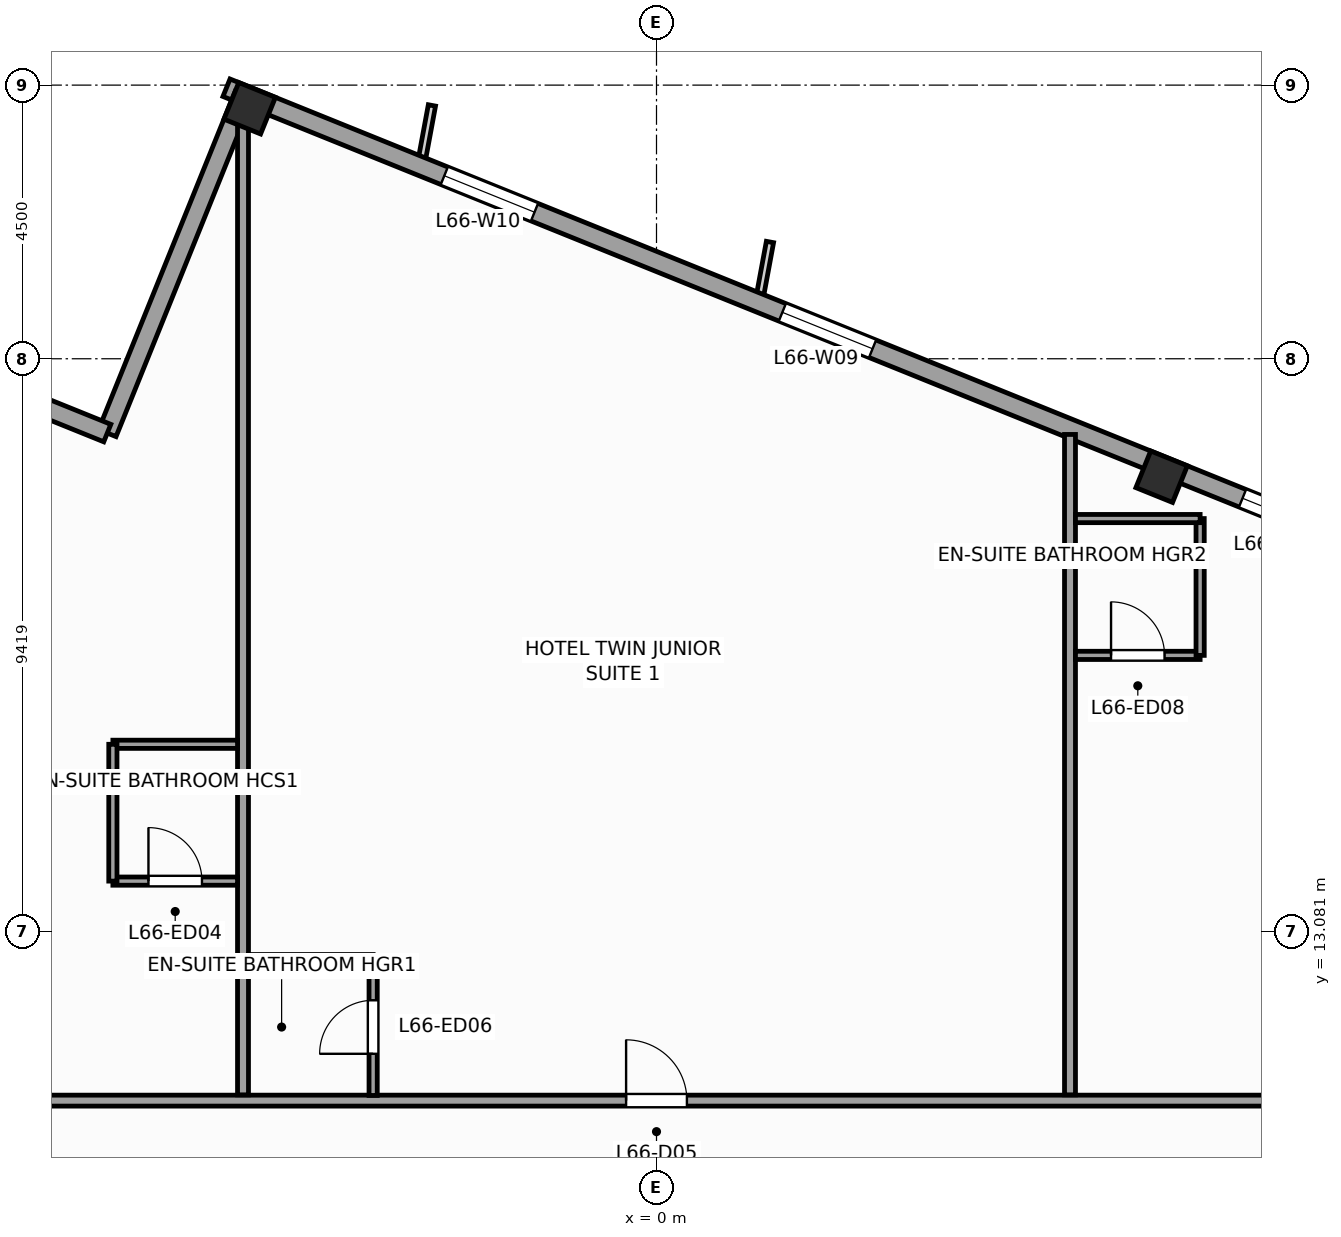
"""IFC4 building model, lengths in metres.
Left out: names, types, materials, properties, quantities, classifications, styles, units other than length and angle.
Written with IfcOpenShell. Run it as: python <this file> out.ifc"""

import sys

from ifc_helpers import new_model, si_unit, direction, frame, frame_2d, origin, origin_2d, place, context, subcontext, project, spatial, rectangle, extrude, source, transform, mapped, element, fill, save


model = new_model("IFC4")
c1 = context("Model", 3, precision=1e-05, world=origin(), true_north=direction((0.0, 1.0)))
c2 = subcontext(c1, "Body", "Model", "MODEL_VIEW")
j1 = project(units=[si_unit("LENGTHUNIT", "METRE"), si_unit("PLANEANGLEUNIT", "RADIAN")], contexts=[c1])
p1 = place(None, origin())
s1 = spatial("IfcSite", under=j1, at=p1, CompositionType="ELEMENT")
p2 = place(p1, origin())
s2 = spatial("IfcBuilding", under=s1, at=p2, CompositionType="ELEMENT")
p3 = place(p2, frame((0.0, 0.0, 272.4)))
s3 = spatial("IfcBuildingStorey", under=s2, at=p3, CompositionType="ELEMENT", Elevation=272.4)
m1 = source(origin(), c2, "Body", "SweptSolid", [
    extrude(rectangle(XDim=0.65, YDim=0.65, at=origin_2d()), origin(), (0.0, 0.0, 1.0), 3.6),
])
for number, where, z_axis, x_axis in (
    (1, (8.307, 20.56, 0.0), (0.0, 0.0, 1.0), (0.375, 0.927, 0.0)),
    (2, (-6.69, 26.62, 0.0), (0.0, 0.0, 1.0), (0.375, 0.927, 0.0)),
):
    element("IfcColumn", number, at=place(p3, frame(where, z_axis=z_axis, x_axis=x_axis)), inside=s3, PredefinedType="COLUMN", context=c2, shape_type="MappedRepresentation", body=[
        mapped(m1, transform((0.0, 0.0, 0.0), scale=1.0)),
    ])
p4 = place(p3, frame((23.813, 14.479, 0.0), z_axis=(0.0, 0.0, 1.0), x_axis=(-0.927182657188, 0.374609557019, 0.0)))
e3 = element("IfcWall", 3, at=p4, inside=s3, PredefinedType="STANDARD", context=c2, shape_type="SweptSolid", body=[
    extrude(rectangle(XDim=33.31, YDim=0.31, at=frame_2d((16.655, 0.0))), origin(), (0.0, 0.0, 1.0), 2.75),
])
p5 = place(p4, frame((3.197, 0.0, 0.47)))
e4 = element("IfcOpeningElement", 4, at=p5, cuts=e3, PredefinedType="OPENING", context=c2, shape_type="SweptSolid", body=[
    extrude(rectangle(XDim=1.6, YDim=2.1, at=frame_2d((0.8, 1.05))), frame((0.0, 0.165, 0.0), z_axis=(0.0, -1.0, 0.0), x_axis=(1.0, 0.0, 0.0)), (0.0, 0.0, 1.0), 0.33),
])
p6 = place(p4, frame((8.86, 0.0, 0.47)))
e5 = element("IfcOpeningElement", 5, at=p6, cuts=e3, PredefinedType="OPENING", context=c2, shape_type="SweptSolid", body=[
    extrude(rectangle(XDim=1.6, YDim=2.1, at=frame_2d((0.8, 1.05))), frame((0.0, 0.165, 0.0), z_axis=(0.0, -1.0, 0.0), x_axis=(1.0, 0.0, 0.0)), (0.0, 0.0, 1.0), 0.33),
])
p7 = place(p4, frame((13.689, 0.0, 0.47)))
e6 = element("IfcOpeningElement", 6, at=p7, cuts=e3, PredefinedType="OPENING", context=c2, shape_type="SweptSolid", body=[
    extrude(rectangle(XDim=1.6, YDim=2.1, at=frame_2d((0.8, 1.05))), frame((0.0, 0.165, 0.0), z_axis=(0.0, -1.0, 0.0), x_axis=(1.0, 0.0, 0.0)), (0.0, 0.0, 1.0), 0.33),
])
p8 = place(p4, frame((21.851, 0.0, 0.47)))
e7 = element("IfcOpeningElement", 7, at=p8, cuts=e3, PredefinedType="OPENING", context=c2, shape_type="SweptSolid", body=[
    extrude(rectangle(XDim=1.6, YDim=2.1, at=frame_2d((0.8, 1.05))), frame((0.0, 0.165, 0.0), z_axis=(0.0, -1.0, 0.0), x_axis=(1.0, 0.0, 0.0)), (0.0, 0.0, 1.0), 0.33),
])
p9 = place(p4, frame((27.847, 0.0, 0.47)))
e8 = element("IfcOpeningElement", 8, at=p9, cuts=e3, PredefinedType="OPENING", context=c2, shape_type="SweptSolid", body=[
    extrude(rectangle(XDim=1.6, YDim=2.1, at=frame_2d((0.8, 1.05))), frame((0.0, 0.165, 0.0), z_axis=(0.0, -1.0, 0.0), x_axis=(1.0, 0.0, 0.0)), (0.0, 0.0, 1.0), 0.33),
])
p10 = place(p3, frame((-6.784, 26.841, 0.0), z_axis=(0.0, 0.0, 1.0), x_axis=(-0.374636620962, -0.927171722085, 0.0)))
e9 = element("IfcWall", 9, at=p10, inside=s3, PredefinedType="STANDARD", context=c2, shape_type="SweptSolid", body=[
    extrude(rectangle(XDim=6.0, YDim=0.31, at=frame_2d((3.0, 0.0))), origin(), (0.0, 0.0, 1.0), 2.65),
])
p11 = place(p3, frame((-9.032, 21.278, 0.0), z_axis=(0.0, 0.0, 1.0), x_axis=(-0.927185411764, 0.374602739196, 0.0)))
e10 = element("IfcWall", 10, at=p11, inside=s3, PredefinedType="STANDARD", context=c2, shape_type="SweptSolid", body=[
    extrude(rectangle(XDim=6.155, YDim=0.31, at=frame_2d((3.078, 0.0))), origin(), (0.0, 0.0, 1.0), 3.35),
])
p12 = place(p11, frame((2.278, 0.0, 0.47)))
e11 = element("IfcOpeningElement", 11, at=p12, cuts=e10, PredefinedType="OPENING", context=c2, shape_type="SweptSolid", body=[
    extrude(rectangle(XDim=1.6, YDim=2.1, at=frame_2d((0.8, 1.05))), frame((0.0, 0.165, 0.0), z_axis=(0.0, -1.0, 0.0), x_axis=(1.0, 0.0, 0.0)), (0.0, 0.0, 1.0), 0.33),
])
p13 = place(p3, frame((-10.3, 10.3, 0.0), z_axis=(0.0, 0.0, 1.0), x_axis=(1.0, 0.0, 0.0)))
e12 = element("IfcWall", 12, at=p13, inside=s3, PredefinedType="PARTITIONING", context=c2, shape_type="SweptSolid", body=[
    extrude(rectangle(XDim=21.7, YDim=0.18, at=frame_2d((10.85, 0.0))), origin(), (0.0, 0.0, 1.0), 3.35),
])
p14 = place(p13, frame((9.8, 0.0, 0.0)))
e13 = element("IfcOpeningElement", 13, at=p14, cuts=e12, PredefinedType="OPENING", context=c2, shape_type="SweptSolid", body=[
    extrude(rectangle(XDim=1.0, YDim=2.15, at=frame_2d((0.5, 1.075))), frame((0.0, 0.1, 0.0), z_axis=(0.0, -1.0, 0.0), x_axis=(1.0, 0.0, 0.0)), (0.0, 0.0, 1.0), 0.2),
])
p15 = place(p3, frame((-6.8, 10.395, 0.0), z_axis=(0.0, 0.0, 1.0), x_axis=(0.0, 1.0, 0.0)))
e14 = element("IfcWall", 14, at=p15, inside=s3, PredefinedType="PARTITIONING", context=c2, shape_type="SweptSolid", body=[
    extrude(rectangle(XDim=16.167, YDim=0.18, at=frame_2d((8.083, 0.0))), origin(), (0.0, 0.0, 1.0), 3.35),
])
p16 = place(p3, frame((6.8, 10.395, 0.0), z_axis=(0.0, 0.0, 1.0), x_axis=(0.0, 1.0, 0.0)))
e15 = element("IfcWall", 15, at=p16, inside=s3, PredefinedType="PARTITIONING", context=c2, shape_type="SweptSolid", body=[
    extrude(rectangle(XDim=10.86, YDim=0.18, at=frame_2d((5.43, 0.0))), origin(), (0.0, 0.0, 1.0), 3.35),
])
p17 = place(p3, frame((-8.94, 13.91, 0.0), z_axis=(0.0, 0.0, 1.0), x_axis=(1.0, 0.0, 0.0)))
e16 = element("IfcWall", 16, at=p17, inside=s3, PredefinedType="PARTITIONING", context=c2, shape_type="SweptSolid", body=[
    extrude(rectangle(XDim=2.05, YDim=0.135, at=frame_2d((1.025, 0.0))), origin(), (0.0, 0.0, 1.0), 3.35),
])
p18 = place(p17, frame((0.585, 0.0, 0.0)))
e17 = element("IfcOpeningElement", 17, at=p18, cuts=e16, PredefinedType="OPENING", context=c2, shape_type="SweptSolid", body=[
    extrude(rectangle(XDim=0.88, YDim=2.1, at=frame_2d((0.44, 1.05))), frame((0.0, 0.078, 0.0), z_axis=(0.0, -1.0, 0.0), x_axis=(1.0, 0.0, 0.0)), (0.0, 0.0, 1.0), 0.155),
])
p19 = place(p3, frame((-8.94, 16.16, 0.0), z_axis=(0.0, 0.0, 1.0), x_axis=(1.0, 0.0, 0.0)))
e18 = element("IfcWall", 18, at=p19, inside=s3, PredefinedType="PARTITIONING", context=c2, shape_type="SweptSolid", body=[
    extrude(rectangle(XDim=2.05, YDim=0.135, at=frame_2d((1.025, 0.0))), origin(), (0.0, 0.0, 1.0), 3.35),
])
p20 = place(p3, frame((-8.94, 13.91, 0.0), z_axis=(0.0, 0.0, 1.0), x_axis=(0.0, 1.0, 0.0)))
e19 = element("IfcWall", 19, at=p20, inside=s3, PredefinedType="PARTITIONING", context=c2, shape_type="SweptSolid", body=[
    extrude(rectangle(XDim=2.25, YDim=0.135, at=frame_2d((1.125, 0.0))), origin(), (0.0, 0.0, 1.0), 3.35),
])
p21 = place(p3, frame((-4.66, 10.385, 0.0), z_axis=(0.0, 0.0, 1.0), x_axis=(0.0, 1.0, 0.0)))
e20 = element("IfcWall", 20, at=p21, inside=s3, PredefinedType="PARTITIONING", context=c2, shape_type="SweptSolid", body=[
    extrude(rectangle(XDim=2.25, YDim=0.135, at=frame_2d((1.125, 0.0))), origin(), (0.0, 0.0, 1.0), 3.35),
])
p22 = place(p21, frame((0.685, 0.0, 0.0)))
e21 = element("IfcOpeningElement", 21, at=p22, cuts=e20, PredefinedType="OPENING", context=c2, shape_type="SweptSolid", body=[
    extrude(rectangle(XDim=0.88, YDim=2.1, at=frame_2d((0.44, 1.05))), frame((0.0, 0.078, 0.0), z_axis=(0.0, -1.0, 0.0), x_axis=(1.0, 0.0, 0.0)), (0.0, 0.0, 1.0), 0.155),
])
p23 = place(p3, frame((-6.71, 12.635, 0.0), z_axis=(0.0, 0.0, 1.0), x_axis=(1.0, 0.0, 0.0)))
e22 = element("IfcWall", 22, at=p23, inside=s3, PredefinedType="PARTITIONING", context=c2, shape_type="SweptSolid", body=[
    extrude(rectangle(XDim=2.05, YDim=0.135, at=frame_2d((1.025, 0.0))), origin(), (0.0, 0.0, 1.0), 3.35),
])
p24 = place(p3, frame((6.89, 17.622, 0.0), z_axis=(0.0, 0.0, 1.0), x_axis=(1.0, 0.0, 0.0)))
e23 = element("IfcWall", 23, at=p24, inside=s3, PredefinedType="PARTITIONING", context=c2, shape_type="SweptSolid", body=[
    extrude(rectangle(XDim=2.05, YDim=0.135, at=frame_2d((1.025, 0.0))), origin(), (0.0, 0.0, 1.0), 2.95),
])
p25 = place(p24, frame((0.585, 0.0, 0.0)))
e24 = element("IfcOpeningElement", 24, at=p25, cuts=e23, PredefinedType="OPENING", context=c2, shape_type="SweptSolid", body=[
    extrude(rectangle(XDim=0.88, YDim=2.1, at=frame_2d((0.44, 1.05))), frame((0.0, 0.078, 0.0), z_axis=(0.0, -1.0, 0.0), x_axis=(1.0, 0.0, 0.0)), (0.0, 0.0, 1.0), 0.155),
])
p26 = place(p3, frame((8.94, 17.622, 0.0), z_axis=(0.0, 0.0, 1.0), x_axis=(0.0, 1.0, 0.0)))
e25 = element("IfcWall", 25, at=p26, inside=s3, PredefinedType="PARTITIONING", context=c2, shape_type="SweptSolid", body=[
    extrude(rectangle(XDim=2.25, YDim=0.135, at=frame_2d((1.125, 0.0))), origin(), (0.0, 0.0, 1.0), 3.35),
])
p27 = place(p3, frame((6.89, 19.872, 0.0), z_axis=(0.0, 0.0, 1.0), x_axis=(1.0, 0.0, 0.0)))
e26 = element("IfcWall", 26, at=p27, inside=s3, PredefinedType="PARTITIONING", context=c2, shape_type="SweptSolid", body=[
    extrude(rectangle(XDim=2.05, YDim=0.135, at=frame_2d((1.025, 0.0))), origin(), (0.0, 0.0, 1.0), 3.35),
])
m2 = source(origin(), c2, "Body", "SweptSolid", [
    extrude(rectangle(XDim=1.6, YDim=2.1, at=frame_2d((0.8, 1.05))), frame((0.0, 0.03, 0.0), z_axis=(0.0, -1.0, 0.0), x_axis=(1.0, 0.0, 0.0)), (0.0, 0.0, 1.0), 0.06),
])
p28 = place(p7, origin())
e27 = element("IfcWindow", 27, at=p28, inside=s3, PartitioningType="SINGLE_PANEL", PredefinedType="WINDOW", context=c2, shape_type="MappedRepresentation", body=[
    mapped(m2, transform((0.0, 0.0, 0.0), scale=1.0)),
])
fill(e6, e27)
p29 = place(p8, origin())
e28 = element("IfcWindow", 28, at=p29, inside=s3, PartitioningType="SINGLE_PANEL", PredefinedType="WINDOW", context=c2, shape_type="MappedRepresentation", body=[
    mapped(m2, transform((0.0, 0.0, 0.0), scale=1.0)),
])
fill(e7, e28)
p30 = place(p9, origin())
e29 = element("IfcWindow", 29, at=p30, inside=s3, PartitioningType="SINGLE_PANEL", PredefinedType="WINDOW", context=c2, shape_type="MappedRepresentation", body=[
    mapped(m2, transform((0.0, 0.0, 0.0), scale=1.0)),
])
fill(e8, e29)
m3 = source(origin(), c2, "Body", "SweptSolid", [
    extrude(rectangle(XDim=0.88, YDim=2.1, at=frame_2d((0.44, 1.05))), frame((0.0, 0.025, 0.0), z_axis=(0.0, -1.0, 0.0), x_axis=(1.0, 0.0, 0.0)), (0.0, 0.0, 1.0), 0.05),
])
p31 = place(p18, origin())
e30 = element("IfcDoor", 30, at=p31, inside=s3, OperationType="SINGLE_SWING_LEFT", PredefinedType="DOOR", context=c2, shape_type="MappedRepresentation", body=[
    mapped(m3, transform((0.0, 0.0, 0.0), scale=1.0)),
])
fill(e17, e30)
m4 = source(origin(), c2, "Body", "SweptSolid", [
    extrude(rectangle(XDim=1.0, YDim=2.15, at=frame_2d((0.5, 1.075))), frame((0.0, 0.025, 0.0), z_axis=(0.0, -1.0, 0.0), x_axis=(1.0, 0.0, 0.0)), (0.0, 0.0, 1.0), 0.05),
])
p32 = place(p14, origin())
e31 = element("IfcDoor", 31, at=p32, inside=s3, OperationType="SINGLE_SWING_LEFT", PredefinedType="DOOR", context=c2, shape_type="MappedRepresentation", body=[
    mapped(m4, transform((0.0, 0.0, 0.0), scale=1.0)),
])
fill(e13, e31)
p33 = place(p22, origin())
e32 = element("IfcDoor", 32, at=p33, inside=s3, OperationType="SINGLE_SWING_LEFT", PredefinedType="DOOR", context=c2, shape_type="MappedRepresentation", body=[
    mapped(m3, transform((0.0, 0.0, 0.0), scale=1.0)),
])
fill(e21, e32)
p34 = place(p25, origin())
e33 = element("IfcDoor", 33, at=p34, inside=s3, OperationType="SINGLE_SWING_LEFT", PredefinedType="DOOR", context=c2, shape_type="MappedRepresentation", body=[
    mapped(m3, transform((0.0, 0.0, 0.0), scale=1.0)),
])
fill(e24, e33)
save(model, sys.argv[1])
